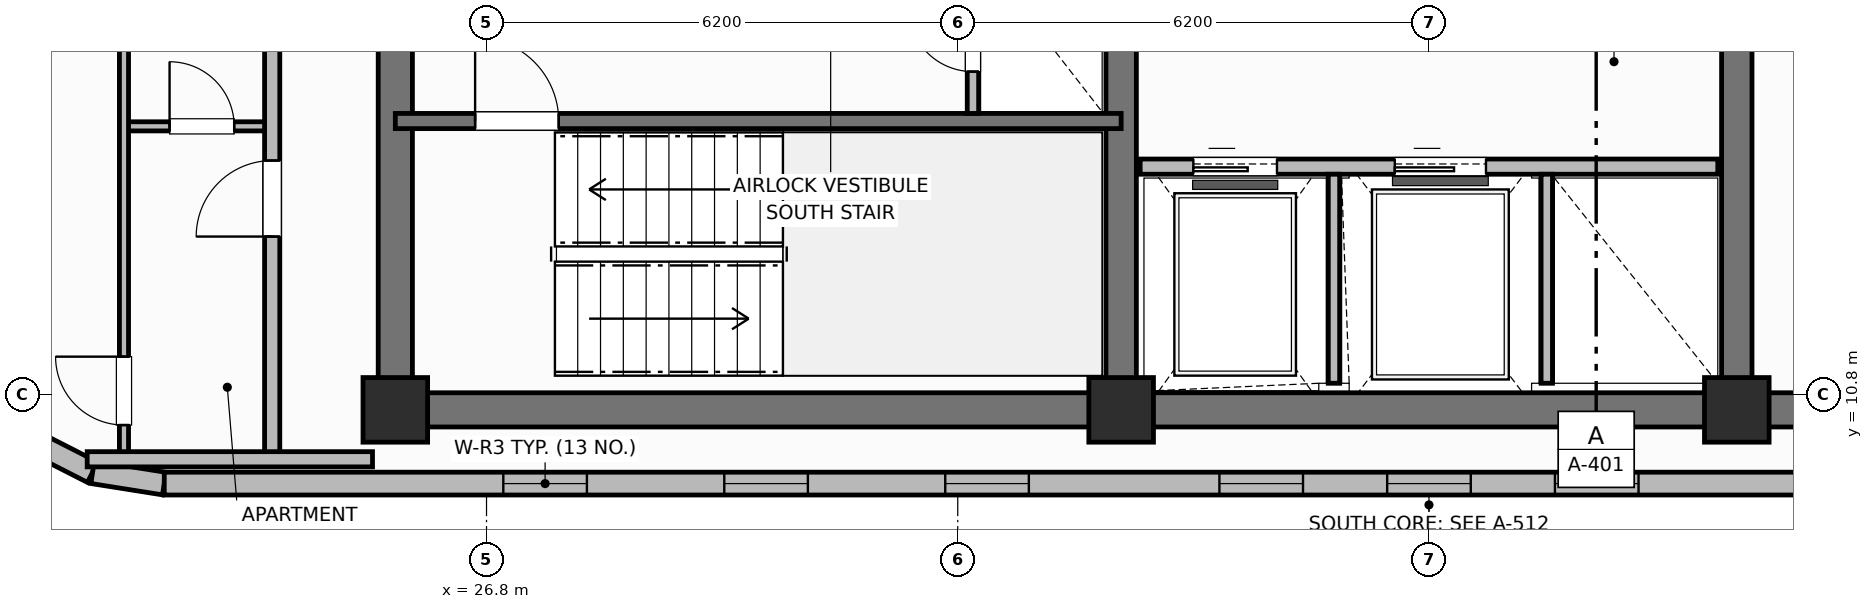
"""IFC4 building model, lengths in metres.
Left out: names, types, materials, properties, quantities, classifications, styles, units other than length and angle.
Written with IfcOpenShell. Run it as: python <this file> out.ifc"""

import sys

from ifc_helpers import new_model, si_unit, direction, frame, frame_2d, origin, origin_2d, place, context, subcontext, project, spatial, rectangle, extrude, element, fill, save


model = new_model("IFC4")
c1 = context("Model", 3, precision=1e-05, world=origin(), true_north=direction((0.0, 1.0)))
c2 = subcontext(c1, "Body", "Model", "MODEL_VIEW")
j1 = project(units=[si_unit("LENGTHUNIT", "METRE"), si_unit("PLANEANGLEUNIT", "RADIAN")], contexts=[c1])
p1 = place(None, origin())
s1 = spatial("IfcSite", under=j1, at=p1, CompositionType="ELEMENT")
p2 = place(p1, origin())
s2 = spatial("IfcBuilding", under=s1, at=p2, CompositionType="ELEMENT")
p3 = place(p2, frame((0.0, 0.0, 233.2)))
s3 = spatial("IfcBuildingStorey", under=s2, at=p3, CompositionType="ELEMENT", Elevation=233.2)
p4 = place(p3, frame((52.8, 10.6, 0.0), z_axis=(0.0, 0.0, 1.0), x_axis=(-1.0, 0.0, 0.0)))
e1 = element("IfcWall", 1, at=p4, inside=s3, PredefinedType="SHEAR", context=c2, shape_type="SweptSolid", body=[
    extrude(rectangle(XDim=27.2, YDim=0.45, at=frame_2d((13.6, 0.0))), origin(), (0.0, 0.0, 1.0), 3.7),
])
p5 = place(p3, frame((25.6, 10.825, 0.0), z_axis=(0.0, 0.0, 1.0), x_axis=(0.0, 1.0, 0.0)))
e2 = element("IfcWall", 2, at=p5, inside=s3, PredefinedType="SHEAR", context=c2, shape_type="SweptSolid", body=[
    extrude(rectangle(XDim=5.75, YDim=0.45, at=frame_2d((2.875, 0.0))), origin(), (0.0, 0.0, 1.0), 3.7),
])
for number, where, z_axis, x_axis in (
    (3, (35.15, 10.825, 0.0), (0.0, 0.0, 1.0), (0.0, 1.0, 0.0)),
    (4, (43.25, 10.825, 0.0), (0.0, 0.0, 1.0), (0.0, 1.0, 0.0)),
):
    element("IfcWall", number, at=place(p3, frame(where, z_axis=z_axis, x_axis=x_axis)), inside=s3, PredefinedType="SHEAR", context=c2, shape_type="SweptSolid", body=[
        extrude(rectangle(XDim=5.75, YDim=0.4, at=frame_2d((2.875, 0.0))), origin(), (0.0, 0.0, 1.0), 3.7),
    ])
for number, where, z_axis, x_axis in (
    (5, (25.6, 10.6, 0.0), (0.0, 0.0, 1.0), (1.0, 0.0, 0.0)),
    (6, (35.15, 10.6, 0.0), (0.0, 0.0, 1.0), (1.0, 0.0, 0.0)),
    (7, (43.25, 10.6, 0.0), (0.0, 0.0, 1.0), (1.0, 0.0, 0.0)),
):
    element("IfcColumn", number, at=place(p3, frame(where, z_axis=z_axis, x_axis=x_axis)), inside=s3, PredefinedType="COLUMN", context=c2, shape_type="SweptSolid", body=[
        extrude(rectangle(XDim=0.85, YDim=0.85, at=origin_2d()), origin(), (0.0, 0.0, 1.0), 3.7),
    ])
p6 = place(p3, frame((20.767, 10.212, 0.0), z_axis=(0.0, 0.0, 1.0), x_axis=(0.891023873617, -0.45395644796, 0.0)))
e8 = element("IfcWall", 8, at=p6, inside=s3, PredefinedType="SOLIDWALL", context=c2, shape_type="SweptSolid", body=[
    extrude(rectangle(XDim=0.954, YDim=0.3, at=frame_2d((0.477, 0.0))), origin(), (0.0, 0.0, 1.0), 2.73),
])
p7 = place(p3, frame((21.617, 9.779, 0.0), z_axis=(0.0, 0.0, 1.0), x_axis=(0.987669453596, -0.156553666304, 0.0)))
e9 = element("IfcWall", 9, at=p7, inside=s3, PredefinedType="SOLIDWALL", context=c2, shape_type="SweptSolid", body=[
    extrude(rectangle(XDim=0.954, YDim=0.3, at=frame_2d((0.477, 0.0))), origin(), (0.0, 0.0, 1.0), 2.73),
])
p8 = place(p3, frame((22.56, 9.63, 0.0), z_axis=(0.0, 0.0, 1.0), x_axis=(1.0, 0.0, 0.0)))
e10 = element("IfcWall", 10, at=p8, inside=s3, PredefinedType="SOLIDWALL", context=c2, shape_type="SweptSolid", body=[
    extrude(rectangle(XDim=33.28, YDim=0.3, at=frame_2d((16.64, 0.0))), origin(), (0.0, 0.0, 1.0), 2.73),
])
p9 = place(p8, frame((4.461, 0.0, 0.95)))
e11 = element("IfcOpeningElement", 11, at=p9, cuts=e10, PredefinedType="OPENING", context=c2, shape_type="SweptSolid", body=[
    extrude(rectangle(XDim=1.1, YDim=1.65, at=frame_2d((0.55, 0.825))), frame((0.0, 0.16, 0.0), z_axis=(0.0, -1.0, 0.0), x_axis=(1.0, 0.0, 0.0)), (0.0, 0.0, 1.0), 0.32),
])
p10 = place(p8, frame((7.368, 0.0, 0.95)))
e12 = element("IfcOpeningElement", 12, at=p10, cuts=e10, PredefinedType="OPENING", context=c2, shape_type="SweptSolid", body=[
    extrude(rectangle(XDim=1.1, YDim=1.65, at=frame_2d((0.55, 0.825))), frame((0.0, 0.16, 0.0), z_axis=(0.0, -1.0, 0.0), x_axis=(1.0, 0.0, 0.0)), (0.0, 0.0, 1.0), 0.32),
])
p11 = place(p8, frame((10.275, 0.0, 0.95)))
e13 = element("IfcOpeningElement", 13, at=p11, cuts=e10, PredefinedType="OPENING", context=c2, shape_type="SweptSolid", body=[
    extrude(rectangle(XDim=1.1, YDim=1.65, at=frame_2d((0.55, 0.825))), frame((0.0, 0.16, 0.0), z_axis=(0.0, -1.0, 0.0), x_axis=(1.0, 0.0, 0.0)), (0.0, 0.0, 1.0), 0.32),
])
p12 = place(p8, frame((13.883, 0.0, 0.95)))
e14 = element("IfcOpeningElement", 14, at=p12, cuts=e10, PredefinedType="OPENING", context=c2, shape_type="SweptSolid", body=[
    extrude(rectangle(XDim=1.1, YDim=1.65, at=frame_2d((0.55, 0.825))), frame((0.0, 0.16, 0.0), z_axis=(0.0, -1.0, 0.0), x_axis=(1.0, 0.0, 0.0)), (0.0, 0.0, 1.0), 0.32),
])
p13 = place(p8, frame((16.09, 0.0, 0.95)))
e15 = element("IfcOpeningElement", 15, at=p13, cuts=e10, PredefinedType="OPENING", context=c2, shape_type="SweptSolid", body=[
    extrude(rectangle(XDim=1.1, YDim=1.65, at=frame_2d((0.55, 0.825))), frame((0.0, 0.16, 0.0), z_axis=(0.0, -1.0, 0.0), x_axis=(1.0, 0.0, 0.0)), (0.0, 0.0, 1.0), 0.32),
])
p14 = place(p8, frame((18.297, 0.0, 0.95)))
e16 = element("IfcOpeningElement", 16, at=p14, cuts=e10, PredefinedType="OPENING", context=c2, shape_type="SweptSolid", body=[
    extrude(rectangle(XDim=1.1, YDim=1.65, at=frame_2d((0.55, 0.825))), frame((0.0, 0.16, 0.0), z_axis=(0.0, -1.0, 0.0), x_axis=(1.0, 0.0, 0.0)), (0.0, 0.0, 1.0), 0.32),
])
p15 = place(p8, frame((21.905, 0.0, 0.95)))
e17 = element("IfcOpeningElement", 17, at=p15, cuts=e10, PredefinedType="OPENING", context=c2, shape_type="SweptSolid", body=[
    extrude(rectangle(XDim=1.1, YDim=1.65, at=frame_2d((0.55, 0.825))), frame((0.0, 0.16, 0.0), z_axis=(0.0, -1.0, 0.0), x_axis=(1.0, 0.0, 0.0)), (0.0, 0.0, 1.0), 0.32),
])
p16 = place(p8, frame((24.812, 0.0, 0.95)))
e18 = element("IfcOpeningElement", 18, at=p16, cuts=e10, PredefinedType="OPENING", context=c2, shape_type="SweptSolid", body=[
    extrude(rectangle(XDim=1.1, YDim=1.65, at=frame_2d((0.55, 0.825))), frame((0.0, 0.16, 0.0), z_axis=(0.0, -1.0, 0.0), x_axis=(1.0, 0.0, 0.0)), (0.0, 0.0, 1.0), 0.32),
])
p17 = place(p8, frame((27.719, 0.0, 0.95)))
e19 = element("IfcOpeningElement", 19, at=p17, cuts=e10, PredefinedType="OPENING", context=c2, shape_type="SweptSolid", body=[
    extrude(rectangle(XDim=1.1, YDim=1.65, at=frame_2d((0.55, 0.825))), frame((0.0, 0.16, 0.0), z_axis=(0.0, -1.0, 0.0), x_axis=(1.0, 0.0, 0.0)), (0.0, 0.0, 1.0), 0.32),
])
p18 = place(p3, frame((25.6, 14.4, 0.0), z_axis=(0.0, 0.0, 1.0), x_axis=(1.0, 0.0, 0.0)))
e20 = element("IfcWall", 20, at=p18, inside=s3, PredefinedType="SHEAR", context=c2, shape_type="SweptSolid", body=[
    extrude(rectangle(XDim=9.55, YDim=0.2, at=frame_2d((4.775, 0.0))), origin(), (0.0, 0.0, 1.0), 3.7),
])
p19 = place(p18, frame((1.05, 0.0, 0.0)))
e21 = element("IfcOpeningElement", 21, at=p19, cuts=e20, PredefinedType="OPENING", context=c2, shape_type="SweptSolid", body=[
    extrude(rectangle(XDim=1.1, YDim=2.15, at=frame_2d((0.55, 1.075))), frame((0.0, 0.11, 0.0), z_axis=(0.0, -1.0, 0.0), x_axis=(1.0, 0.0, 0.0)), (0.0, 0.0, 1.0), 0.22),
])
p20 = place(p3, frame((33.2, 14.5, 0.0), z_axis=(0.0, 0.0, 1.0), x_axis=(0.0, 1.0, 0.0)))
e22 = element("IfcWall", 22, at=p20, inside=s3, PredefinedType="PARTITIONING", context=c2, shape_type="SweptSolid", body=[
    extrude(rectangle(XDim=2.08, YDim=0.15, at=frame_2d((1.04, 0.0))), origin(), (0.0, 0.0, 1.0), 2.56),
])
p21 = place(p20, frame((0.55, 0.0, 0.0)))
e23 = element("IfcOpeningElement", 23, at=p21, cuts=e22, PredefinedType="OPENING", context=c2, shape_type="SweptSolid", body=[
    extrude(rectangle(XDim=0.85, YDim=2.05, at=frame_2d((0.425, 1.025))), frame((0.0, 0.085, 0.0), z_axis=(0.0, -1.0, 0.0), x_axis=(1.0, 0.0, 0.0)), (0.0, 0.0, 1.0), 0.17),
])
p22 = place(p3, frame((35.4, 13.8, 0.0), z_axis=(0.0, 0.0, 1.0), x_axis=(1.0, 0.0, 0.0)))
e24 = element("IfcWall", 24, at=p22, inside=s3, PredefinedType="PARTITIONING", context=c2, shape_type="SweptSolid", body=[
    extrude(rectangle(XDim=7.6, YDim=0.2, at=frame_2d((3.8, 0.0))), origin(), (0.0, 0.0, 1.0), 2.33),
])
p23 = place(p22, frame((0.7, 0.0, 0.0)))
e25 = element("IfcOpeningElement", 25, at=p23, cuts=e24, PredefinedType="OPENING", context=c2, shape_type="SweptSolid", body=[
    extrude(rectangle(XDim=1.1, YDim=2.15, at=frame_2d((0.55, 1.075))), frame((0.0, 0.11, 0.0), z_axis=(0.0, -1.0, 0.0), x_axis=(1.0, 0.0, 0.0)), (0.0, 0.0, 1.0), 0.22),
])
p24 = place(p22, frame((3.35, 0.0, 0.0)))
e26 = element("IfcOpeningElement", 26, at=p24, cuts=e24, PredefinedType="OPENING", context=c2, shape_type="SweptSolid", body=[
    extrude(rectangle(XDim=1.2, YDim=2.15, at=frame_2d((0.6, 1.075))), frame((0.0, 0.11, 0.0), z_axis=(0.0, -1.0, 0.0), x_axis=(1.0, 0.0, 0.0)), (0.0, 0.0, 1.0), 0.22),
])
for number, where, z_axis, x_axis in (
    (27, (37.95, 10.95, 0.0), (0.0, 0.0, 1.0), (0.0, 1.0, 0.0)),
    (28, (40.75, 10.95, 0.0), (0.0, 0.0, 1.0), (0.0, 1.0, 0.0)),
):
    element("IfcWall", number, at=place(p3, frame(where, z_axis=z_axis, x_axis=x_axis)), inside=s3, PredefinedType="PARTITIONING", context=c2, shape_type="SweptSolid", body=[
        extrude(rectangle(XDim=2.75, YDim=0.15, at=frame_2d((1.375, 0.0))), origin(), (0.0, 0.0, 1.0), 2.56),
    ])
p25 = place(p3, frame((22.03, 14.33, 0.0), z_axis=(0.0, 0.0, 1.0), x_axis=(1.0, 0.0, 0.0)))
e29 = element("IfcWall", 29, at=p25, inside=s3, PredefinedType="PARTITIONING", context=c2, shape_type="SweptSolid", body=[
    extrude(rectangle(XDim=1.95, YDim=0.12, at=frame_2d((0.975, 0.0))), origin(), (0.0, 0.0, 1.0), 2.56),
])
p26 = place(p25, frame((0.6, 0.0, 0.0)))
e30 = element("IfcOpeningElement", 30, at=p26, cuts=e29, PredefinedType="OPENING", context=c2, shape_type="SweptSolid", body=[
    extrude(rectangle(XDim=0.85, YDim=2.1, at=frame_2d((0.425, 1.05))), frame((0.0, 0.07, 0.0), z_axis=(0.0, -1.0, 0.0), x_axis=(1.0, 0.0, 0.0)), (0.0, 0.0, 1.0), 0.14),
])
p27 = place(p3, frame((22.03, 9.99, 0.0), z_axis=(0.0, 0.0, 1.0), x_axis=(0.0, 1.0, 0.0)))
e31 = element("IfcWall", 31, at=p27, inside=s3, PredefinedType="PARTITIONING", context=c2, shape_type="SweptSolid", body=[
    extrude(rectangle(XDim=9.045, YDim=0.12, at=frame_2d((4.522, 0.0))), origin(), (0.0, 0.0, 1.0), 2.56),
])
p28 = place(p27, frame((0.41, 0.0, 0.0)))
e32 = element("IfcOpeningElement", 32, at=p28, cuts=e31, PredefinedType="OPENING", context=c2, shape_type="SweptSolid", body=[
    extrude(rectangle(XDim=0.9, YDim=2.1, at=frame_2d((0.45, 1.05))), frame((0.0, 0.07, 0.0), z_axis=(0.0, -1.0, 0.0), x_axis=(1.0, 0.0, 0.0)), (0.0, 0.0, 1.0), 0.14),
])
p29 = place(p3, frame((23.98, 9.95, 0.0), z_axis=(0.0, 0.0, 1.0), x_axis=(0.0, 1.0, 0.0)))
e33 = element("IfcWall", 33, at=p29, inside=s3, PredefinedType="PARTITIONING", context=c2, shape_type="SweptSolid", body=[
    extrude(rectangle(XDim=36.5, YDim=0.2, at=frame_2d((18.25, 0.0))), origin(), (0.0, 0.0, 1.0), 2.56),
])
p30 = place(p29, frame((2.93, 0.0, 0.0)))
e34 = element("IfcOpeningElement", 34, at=p30, cuts=e33, PredefinedType="OPENING", context=c2, shape_type="SweptSolid", body=[
    extrude(rectangle(XDim=1.0, YDim=2.15, at=frame_2d((0.5, 1.075))), frame((0.0, 0.11, 0.0), z_axis=(0.0, -1.0, 0.0), x_axis=(1.0, 0.0, 0.0)), (0.0, 0.0, 1.0), 0.22),
])
p31 = place(p29, frame((10.525, 0.0, 0.0)))
e35 = element("IfcOpeningElement", 35, at=p31, cuts=e33, PredefinedType="OPENING", context=c2, shape_type="SweptSolid", body=[
    extrude(rectangle(XDim=1.0, YDim=2.15, at=frame_2d((0.5, 1.075))), frame((0.0, 0.11, 0.0), z_axis=(0.0, -1.0, 0.0), x_axis=(1.0, 0.0, 0.0)), (0.0, 0.0, 1.0), 0.22),
])
p32 = place(p29, frame((15.175, 0.0, 0.0)))
e36 = element("IfcOpeningElement", 36, at=p32, cuts=e33, PredefinedType="OPENING", context=c2, shape_type="SweptSolid", body=[
    extrude(rectangle(XDim=1.0, YDim=2.15, at=frame_2d((0.5, 1.075))), frame((0.0, 0.11, 0.0), z_axis=(0.0, -1.0, 0.0), x_axis=(1.0, 0.0, 0.0)), (0.0, 0.0, 1.0), 0.22),
])
p33 = place(p29, frame((27.925, 0.0, 0.0)))
e37 = element("IfcOpeningElement", 37, at=p33, cuts=e33, PredefinedType="OPENING", context=c2, shape_type="SweptSolid", body=[
    extrude(rectangle(XDim=1.0, YDim=2.15, at=frame_2d((0.5, 1.075))), frame((0.0, 0.11, 0.0), z_axis=(0.0, -1.0, 0.0), x_axis=(1.0, 0.0, 0.0)), (0.0, 0.0, 1.0), 0.22),
])
p34 = place(p3, frame((21.546, 9.95, 0.0), z_axis=(0.0, 0.0, 1.0), x_axis=(1.0, 0.0, 0.0)))
e38 = element("IfcWall", 38, at=p34, inside=s3, PredefinedType="PARTITIONING", context=c2, shape_type="SweptSolid", body=[
    extrude(rectangle(XDim=3.754, YDim=0.2, at=frame_2d((1.877, 0.0))), origin(), (0.0, 0.0, 1.0), 2.56),
])
p35 = place(p9, origin())
e39 = element("IfcWindow", 39, at=p35, inside=s3, PartitioningType="SINGLE_PANEL", PredefinedType="WINDOW", context=c2, shape_type="SweptSolid", body=[
    extrude(rectangle(XDim=1.1, YDim=1.65, at=frame_2d((0.55, 0.825))), frame((0.0, 0.03, 0.0), z_axis=(0.0, -1.0, 0.0), x_axis=(1.0, 0.0, 0.0)), (0.0, 0.0, 1.0), 0.06),
])
fill(e11, e39)
p36 = place(p10, origin())
e40 = element("IfcWindow", 40, at=p36, inside=s3, PartitioningType="SINGLE_PANEL", PredefinedType="WINDOW", context=c2, shape_type="SweptSolid", body=[
    extrude(rectangle(XDim=1.1, YDim=1.65, at=frame_2d((0.55, 0.825))), frame((0.0, 0.03, 0.0), z_axis=(0.0, -1.0, 0.0), x_axis=(1.0, 0.0, 0.0)), (0.0, 0.0, 1.0), 0.06),
])
fill(e12, e40)
p37 = place(p11, origin())
e41 = element("IfcWindow", 41, at=p37, inside=s3, PartitioningType="SINGLE_PANEL", PredefinedType="WINDOW", context=c2, shape_type="SweptSolid", body=[
    extrude(rectangle(XDim=1.1, YDim=1.65, at=frame_2d((0.55, 0.825))), frame((0.0, 0.03, 0.0), z_axis=(0.0, -1.0, 0.0), x_axis=(1.0, 0.0, 0.0)), (0.0, 0.0, 1.0), 0.06),
])
fill(e13, e41)
p38 = place(p12, origin())
e42 = element("IfcWindow", 42, at=p38, inside=s3, PartitioningType="SINGLE_PANEL", PredefinedType="WINDOW", context=c2, shape_type="SweptSolid", body=[
    extrude(rectangle(XDim=1.1, YDim=1.65, at=frame_2d((0.55, 0.825))), frame((0.0, 0.03, 0.0), z_axis=(0.0, -1.0, 0.0), x_axis=(1.0, 0.0, 0.0)), (0.0, 0.0, 1.0), 0.06),
])
fill(e14, e42)
p39 = place(p13, origin())
e43 = element("IfcWindow", 43, at=p39, inside=s3, PartitioningType="SINGLE_PANEL", PredefinedType="WINDOW", context=c2, shape_type="SweptSolid", body=[
    extrude(rectangle(XDim=1.1, YDim=1.65, at=frame_2d((0.55, 0.825))), frame((0.0, 0.03, 0.0), z_axis=(0.0, -1.0, 0.0), x_axis=(1.0, 0.0, 0.0)), (0.0, 0.0, 1.0), 0.06),
])
fill(e15, e43)
p40 = place(p14, origin())
e44 = element("IfcWindow", 44, at=p40, inside=s3, PartitioningType="SINGLE_PANEL", PredefinedType="WINDOW", context=c2, shape_type="SweptSolid", body=[
    extrude(rectangle(XDim=1.1, YDim=1.65, at=frame_2d((0.55, 0.825))), frame((0.0, 0.03, 0.0), z_axis=(0.0, -1.0, 0.0), x_axis=(1.0, 0.0, 0.0)), (0.0, 0.0, 1.0), 0.06),
])
fill(e16, e44)
p41 = place(p19, origin())
e45 = element("IfcDoor", 45, at=p41, inside=s3, OperationType="SINGLE_SWING_LEFT", PredefinedType="DOOR", context=c2, shape_type="SweptSolid", body=[
    extrude(rectangle(XDim=1.1, YDim=2.15, at=frame_2d((0.55, 1.075))), frame((0.0, 0.025, 0.0), z_axis=(0.0, -1.0, 0.0), x_axis=(1.0, 0.0, 0.0)), (0.0, 0.0, 1.0), 0.05),
])
fill(e21, e45)
p42 = place(p21, origin())
e46 = element("IfcDoor", 46, at=p42, inside=s3, OperationType="SINGLE_SWING_RIGHT", PredefinedType="TRAPDOOR", context=c2, shape_type="SweptSolid", body=[
    extrude(rectangle(XDim=0.85, YDim=2.05, at=frame_2d((0.425, 1.025))), frame((0.0, 0.025, 0.0), z_axis=(0.0, -1.0, 0.0), x_axis=(1.0, 0.0, 0.0)), (0.0, 0.0, 1.0), 0.05),
])
fill(e23, e46)
p43 = place(p23, origin())
e47 = element("IfcDoor", 47, at=p43, inside=s3, OperationType="SLIDING_TO_LEFT", PredefinedType="DOOR", context=c2, shape_type="SweptSolid", body=[
    extrude(rectangle(XDim=1.1, YDim=2.15, at=frame_2d((0.55, 1.075))), frame((0.0, 0.025, 0.0), z_axis=(0.0, -1.0, 0.0), x_axis=(1.0, 0.0, 0.0)), (0.0, 0.0, 1.0), 0.05),
])
fill(e25, e47)
p44 = place(p24, origin())
e48 = element("IfcDoor", 48, at=p44, inside=s3, OperationType="SLIDING_TO_LEFT", PredefinedType="DOOR", context=c2, shape_type="SweptSolid", body=[
    extrude(rectangle(XDim=1.2, YDim=2.15, at=frame_2d((0.6, 1.075))), frame((0.0, 0.025, 0.0), z_axis=(0.0, -1.0, 0.0), x_axis=(1.0, 0.0, 0.0)), (0.0, 0.0, 1.0), 0.05),
])
fill(e26, e48)
p45 = place(p26, origin())
e49 = element("IfcDoor", 49, at=p45, inside=s3, OperationType="SINGLE_SWING_LEFT", PredefinedType="DOOR", context=c2, shape_type="SweptSolid", body=[
    extrude(rectangle(XDim=0.85, YDim=2.1, at=frame_2d((0.425, 1.05))), frame((0.0, 0.025, 0.0), z_axis=(0.0, -1.0, 0.0), x_axis=(1.0, 0.0, 0.0)), (0.0, 0.0, 1.0), 0.05),
])
fill(e30, e49)
p46 = place(p28, origin())
e50 = element("IfcDoor", 50, at=p46, inside=s3, OperationType="SINGLE_SWING_RIGHT", PredefinedType="DOOR", context=c2, shape_type="SweptSolid", body=[
    extrude(rectangle(XDim=0.9, YDim=2.1, at=frame_2d((0.45, 1.05))), frame((0.0, 0.025, 0.0), z_axis=(0.0, -1.0, 0.0), x_axis=(1.0, 0.0, 0.0)), (0.0, 0.0, 1.0), 0.05),
])
fill(e32, e50)
p47 = place(p30, origin())
e51 = element("IfcDoor", 51, at=p47, inside=s3, OperationType="SINGLE_SWING_LEFT", PredefinedType="DOOR", context=c2, shape_type="SweptSolid", body=[
    extrude(rectangle(XDim=1.0, YDim=2.15, at=frame_2d((0.5, 1.075))), frame((0.0, 0.025, 0.0), z_axis=(0.0, -1.0, 0.0), x_axis=(1.0, 0.0, 0.0)), (0.0, 0.0, 1.0), 0.05),
])
fill(e34, e51)
save(model, sys.argv[1])
